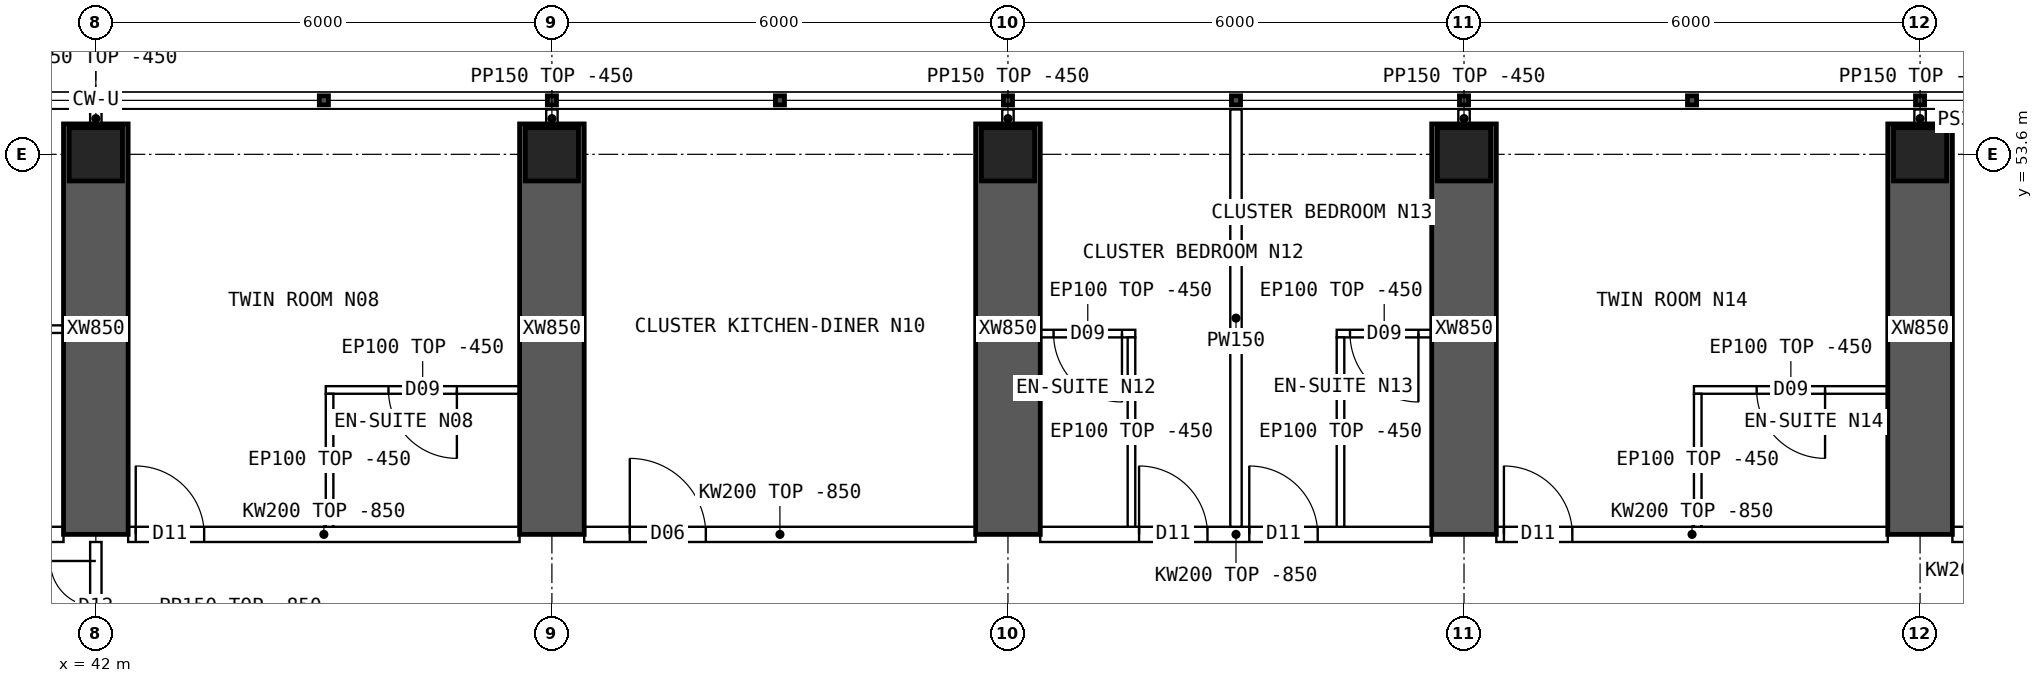
"""IFC4 building model, lengths in metres.
Left out: names, types, materials, properties, quantities, classifications, styles, units other than length and angle.
Written with IfcOpenShell. Run it as: python <this file> out.ifc"""

import sys

from ifc_helpers import new_model, si_unit, direction, frame, frame_2d, origin, origin_2d, place, context, subcontext, project, spatial, polyline, rectangle, hollow_rectangle, outline, extrude, element, fill, save


model = new_model("IFC4")
c1 = context("Model", 3, precision=1e-05, world=origin(), true_north=direction((0.0, 1.0)))
c2 = subcontext(c1, "Body", "Model", "MODEL_VIEW")
j1 = project(units=[si_unit("LENGTHUNIT", "METRE"), si_unit("PLANEANGLEUNIT", "RADIAN")], contexts=[c1])
p1 = place(None, origin())
s1 = spatial("IfcSite", under=j1, at=p1, CompositionType="ELEMENT")
p2 = place(p1, origin())
s2 = spatial("IfcBuilding", under=s1, at=p2, CompositionType="ELEMENT")
p3 = place(p2, frame((0.0, 0.0, 189.85)))
s3 = spatial("IfcBuildingStorey", under=s2, at=p3, CompositionType="ELEMENT", Elevation=189.85)
for number, where, z_axis, x_axis in (
    (1, (42.0, 53.6, 0.0), (0.0, 0.0, 1.0), (1.0, 0.0, 0.0)),
    (2, (48.0, 53.6, 0.0), (0.0, 0.0, 1.0), (1.0, 0.0, 0.0)),
    (3, (54.0, 53.6, 0.0), (0.0, 0.0, 1.0), (1.0, 0.0, 0.0)),
    (4, (60.0, 53.6, 0.0), (0.0, 0.0, 1.0), (1.0, 0.0, 0.0)),
    (5, (66.0, 53.6, 0.0), (0.0, 0.0, 1.0), (1.0, 0.0, 0.0)),
):
    element("IfcColumn", number, at=place(p3, frame(where, z_axis=z_axis, x_axis=x_axis)), inside=s3, PredefinedType="COLUMN", context=c2, shape_type="SweptSolid", body=[
        extrude(hollow_rectangle(XDim=0.7, YDim=0.7, WallThickness=0.07, at=origin_2d()), origin(), (0.0, 0.0, 1.0), 3.75),
    ])
for number, where, z_axis, x_axis in (
    (6, (42.0, 48.6, 0.0), (0.0, 0.0, 1.0), (0.0, 1.0, 0.0)),
    (7, (48.0, 48.6, 0.0), (0.0, 0.0, 1.0), (0.0, 1.0, 0.0)),
    (8, (54.0, 48.6, 0.0), (0.0, 0.0, 1.0), (0.0, 1.0, 0.0)),
    (9, (60.0, 48.6, 0.0), (0.0, 0.0, 1.0), (0.0, 1.0, 0.0)),
    (10, (66.0, 48.6, 0.0), (0.0, 0.0, 1.0), (0.0, 1.0, 0.0)),
):
    element("IfcWall", number, at=place(p3, frame(where, z_axis=z_axis, x_axis=x_axis)), inside=s3, PredefinedType="SHEAR", context=c2, shape_type="SweptSolid", body=[
        extrude(rectangle(XDim=5.4, YDim=0.85, at=frame_2d((2.7, 0.0))), origin(), (0.0, 0.0, 1.0), 3.75),
    ])
p4 = place(p3, frame((66.8, 54.05, 0.0), z_axis=(0.0, 0.0, 1.0), x_axis=(-1.0, 0.0, 0.0)))
e11 = element("IfcWall", 11, at=p4, inside=s3, PredefinedType="SOLIDWALL", context=c2, shape_type="SweptSolid", body=[
    extrude(rectangle(XDim=0.375, YDim=0.3, at=frame_2d((0.188, 0.0))), origin(), (0.0, 0.0, 1.0), 3.3),
])
p5 = place(p3, frame((36.425, 48.6, 0.0), z_axis=(0.0, 0.0, 1.0), x_axis=(1.0, 0.0, 0.0)))
e12 = element("IfcWall", 12, at=p5, inside=s3, PredefinedType="SOLIDWALL", context=c2, shape_type="SweptSolid", body=[
    extrude(outline(polyline([(0.0, 0.0), (5.15, 0.0), (5.15, 2.9), (0.0, 2.9), (0.0, 0.0)])), frame((0.0, 0.1, 0.0), z_axis=(0.0, -1.0, 0.0), x_axis=(1.0, 0.0, 0.0)), (0.0, 0.0, 1.0), 0.2),
])
p6 = place(p5, frame((0.3, 0.0, 0.0)))
e13 = element("IfcOpeningElement", 13, at=p6, cuts=e12, PredefinedType="OPENING", context=c2, shape_type="SweptSolid", body=[
    extrude(rectangle(XDim=1.0, YDim=2.1, at=frame_2d((0.5, 1.05))), frame((0.0, 0.11, 0.0), z_axis=(0.0, -1.0, 0.0), x_axis=(1.0, 0.0, 0.0)), (0.0, 0.0, 1.0), 0.22),
])
p7 = place(p3, frame((42.425, 48.6, 0.0), z_axis=(0.0, 0.0, 1.0), x_axis=(1.0, 0.0, 0.0)))
e14 = element("IfcWall", 14, at=p7, inside=s3, PredefinedType="SOLIDWALL", context=c2, shape_type="SweptSolid", body=[
    extrude(outline(polyline([(0.0, 0.0), (5.15, 0.0), (5.15, 2.9), (0.0, 2.9), (0.0, 0.0)])), frame((0.0, 0.1, 0.0), z_axis=(0.0, -1.0, 0.0), x_axis=(1.0, 0.0, 0.0)), (0.0, 0.0, 1.0), 0.2),
])
p8 = place(p7, frame((0.1, 0.0, 0.0)))
e15 = element("IfcOpeningElement", 15, at=p8, cuts=e14, PredefinedType="OPENING", context=c2, shape_type="SweptSolid", body=[
    extrude(rectangle(XDim=0.9, YDim=2.1, at=frame_2d((0.45, 1.05))), frame((0.0, 0.11, 0.0), z_axis=(0.0, -1.0, 0.0), x_axis=(1.0, 0.0, 0.0)), (0.0, 0.0, 1.0), 0.22),
])
p9 = place(p3, frame((48.425, 48.6, 0.0), z_axis=(0.0, 0.0, 1.0), x_axis=(1.0, 0.0, 0.0)))
e16 = element("IfcWall", 16, at=p9, inside=s3, PredefinedType="SOLIDWALL", context=c2, shape_type="SweptSolid", body=[
    extrude(outline(polyline([(0.0, 0.0), (5.15, 0.0), (5.15, 2.9), (0.0, 2.9), (0.0, 0.0)])), frame((0.0, 0.1, 0.0), z_axis=(0.0, -1.0, 0.0), x_axis=(1.0, 0.0, 0.0)), (0.0, 0.0, 1.0), 0.2),
])
p10 = place(p9, frame((0.6, 0.0, 0.0)))
e17 = element("IfcOpeningElement", 17, at=p10, cuts=e16, PredefinedType="OPENING", context=c2, shape_type="SweptSolid", body=[
    extrude(rectangle(XDim=1.0, YDim=2.1, at=frame_2d((0.5, 1.05))), frame((0.0, 0.11, 0.0), z_axis=(0.0, -1.0, 0.0), x_axis=(1.0, 0.0, 0.0)), (0.0, 0.0, 1.0), 0.22),
])
p11 = place(p3, frame((54.425, 48.6, 0.0), z_axis=(0.0, 0.0, 1.0), x_axis=(1.0, 0.0, 0.0)))
e18 = element("IfcWall", 18, at=p11, inside=s3, PredefinedType="SOLIDWALL", context=c2, shape_type="SweptSolid", body=[
    extrude(outline(polyline([(0.0, 0.0), (5.15, 0.0), (5.15, 2.9), (0.0, 2.9), (0.0, 0.0)])), frame((0.0, 0.1, 0.0), z_axis=(0.0, -1.0, 0.0), x_axis=(1.0, 0.0, 0.0)), (0.0, 0.0, 1.0), 0.2),
])
p12 = place(p11, frame((1.3, 0.0, 0.0)))
e19 = element("IfcOpeningElement", 19, at=p12, cuts=e18, PredefinedType="OPENING", context=c2, shape_type="SweptSolid", body=[
    extrude(rectangle(XDim=0.9, YDim=2.1, at=frame_2d((0.45, 1.05))), frame((0.0, 0.11, 0.0), z_axis=(0.0, -1.0, 0.0), x_axis=(1.0, 0.0, 0.0)), (0.0, 0.0, 1.0), 0.22),
])
p13 = place(p11, frame((2.75, 0.0, 0.0)))
e20 = element("IfcOpeningElement", 20, at=p13, cuts=e18, PredefinedType="OPENING", context=c2, shape_type="SweptSolid", body=[
    extrude(rectangle(XDim=0.9, YDim=2.1, at=frame_2d((0.45, 1.05))), frame((0.0, 0.11, 0.0), z_axis=(0.0, -1.0, 0.0), x_axis=(1.0, 0.0, 0.0)), (0.0, 0.0, 1.0), 0.22),
])
p14 = place(p3, frame((60.425, 48.6, 0.0), z_axis=(0.0, 0.0, 1.0), x_axis=(1.0, 0.0, 0.0)))
e21 = element("IfcWall", 21, at=p14, inside=s3, PredefinedType="SOLIDWALL", context=c2, shape_type="SweptSolid", body=[
    extrude(outline(polyline([(0.0, 0.0), (5.15, 0.0), (5.15, 2.9), (0.0, 2.9), (0.0, 0.0)])), frame((0.0, 0.1, 0.0), z_axis=(0.0, -1.0, 0.0), x_axis=(1.0, 0.0, 0.0)), (0.0, 0.0, 1.0), 0.2),
])
p15 = place(p14, frame((0.1, 0.0, 0.0)))
e22 = element("IfcOpeningElement", 22, at=p15, cuts=e21, PredefinedType="OPENING", context=c2, shape_type="SweptSolid", body=[
    extrude(rectangle(XDim=0.9, YDim=2.1, at=frame_2d((0.45, 1.05))), frame((0.0, 0.11, 0.0), z_axis=(0.0, -1.0, 0.0), x_axis=(1.0, 0.0, 0.0)), (0.0, 0.0, 1.0), 0.22),
])
p16 = place(p3, frame((66.425, 48.6, 0.0), z_axis=(0.0, 0.0, 1.0), x_axis=(1.0, 0.0, 0.0)))
e23 = element("IfcWall", 23, at=p16, inside=s3, PredefinedType="SOLIDWALL", context=c2, shape_type="SweptSolid", body=[
    extrude(rectangle(XDim=1.975, YDim=0.2, at=frame_2d((0.987, 0.0))), origin(), (0.0, 0.0, 1.0), 3.3),
])
p17 = place(p16, frame((0.2, 0.0, 0.0)))
e24 = element("IfcOpeningElement", 24, at=p17, cuts=e23, PredefinedType="OPENING", context=c2, shape_type="SweptSolid", body=[
    extrude(rectangle(XDim=0.9, YDim=2.1, at=frame_2d((0.45, 1.05))), frame((0.0, 0.11, 0.0), z_axis=(0.0, -1.0, 0.0), x_axis=(1.0, 0.0, 0.0)), (0.0, 0.0, 1.0), 0.22),
])
p18 = place(p3, frame((38.925, 51.3, 0.0), z_axis=(0.0, 0.0, 1.0), x_axis=(1.0, 0.0, 0.0)))
e25 = element("IfcWall", 25, at=p18, inside=s3, PredefinedType="PARTITIONING", context=c2, shape_type="SweptSolid", body=[
    extrude(rectangle(XDim=2.65, YDim=0.1, at=frame_2d((1.325, 0.0))), origin(), (0.0, 0.0, 1.0), 3.3),
])
p19 = place(p3, frame((45.025, 50.5, 0.0), z_axis=(0.0, 0.0, 1.0), x_axis=(1.0, 0.0, 0.0)))
e26 = element("IfcWall", 26, at=p19, inside=s3, PredefinedType="PARTITIONING", context=c2, shape_type="SweptSolid", body=[
    extrude(rectangle(XDim=2.55, YDim=0.1, at=frame_2d((1.275, 0.0))), origin(), (0.0, 0.0, 1.0), 3.3),
])
p20 = place(p19, frame((0.825, 0.0, 0.0)))
e27 = element("IfcOpeningElement", 27, at=p20, cuts=e26, PredefinedType="OPENING", context=c2, shape_type="SweptSolid", body=[
    extrude(rectangle(XDim=0.9, YDim=2.1, at=frame_2d((0.45, 1.05))), frame((0.0, 0.06, 0.0), z_axis=(0.0, -1.0, 0.0), x_axis=(1.0, 0.0, 0.0)), (0.0, 0.0, 1.0), 0.12),
])
p21 = place(p3, frame((45.075, 50.45, 0.0), z_axis=(0.0, 0.0, 1.0), x_axis=(0.0, -1.0, 0.0)))
e28 = element("IfcWall", 28, at=p21, inside=s3, PredefinedType="PARTITIONING", context=c2, shape_type="SweptSolid", body=[
    extrude(outline(polyline([(0.0, 0.0), (1.75, 0.0), (1.75, 2.9), (1.702, 2.9), (1.7, 3.3), (0.0, 3.3), (0.0, 0.0)])), frame((0.0, 0.05, 0.0), z_axis=(0.0, -1.0, 0.0), x_axis=(1.0, 0.0, 0.0)), (0.0, 0.0, 1.0), 0.1),
])
p22 = place(p3, frame((57.0, 54.19, 0.0), z_axis=(0.0, 0.0, 1.0), x_axis=(0.0, -1.0, 0.0)))
e29 = element("IfcWall", 29, at=p22, inside=s3, PredefinedType="PARTITIONING", context=c2, shape_type="SweptSolid", body=[
    extrude(outline(polyline([(0.0, 0.0), (5.49, 0.0), (5.49, 2.9), (5.442, 2.9), (5.44, 3.3), (0.792, 3.3), (0.79, 2.9), (0.392, 2.9), (0.39, 3.3), (0.0, 3.3), (0.0, 0.0)])), frame((0.0, 0.075, 0.0), z_axis=(0.0, -1.0, 0.0), x_axis=(1.0, 0.0, 0.0)), (0.0, 0.0, 1.0), 0.15),
])
p23 = place(p3, frame((54.425, 51.242, 0.0), z_axis=(0.0, 0.0, 1.0), x_axis=(1.0, 0.0, 0.0)))
e30 = element("IfcWall", 30, at=p23, inside=s3, PredefinedType="PARTITIONING", context=c2, shape_type="SweptSolid", body=[
    extrude(rectangle(XDim=1.25, YDim=0.1, at=frame_2d((0.625, 0.0))), origin(), (0.0, 0.0, 1.0), 3.3),
])
p24 = place(p23, frame((0.175, 0.0, 0.0)))
e31 = element("IfcOpeningElement", 31, at=p24, cuts=e30, PredefinedType="OPENING", context=c2, shape_type="SweptSolid", body=[
    extrude(rectangle(XDim=0.9, YDim=2.1, at=frame_2d((0.45, 1.05))), frame((0.0, 0.06, 0.0), z_axis=(0.0, -1.0, 0.0), x_axis=(1.0, 0.0, 0.0)), (0.0, 0.0, 1.0), 0.12),
])
p25 = place(p3, frame((55.625, 51.192, 0.0), z_axis=(0.0, 0.0, 1.0), x_axis=(0.0, -1.0, 0.0)))
e32 = element("IfcWall", 32, at=p25, inside=s3, PredefinedType="PARTITIONING", context=c2, shape_type="SweptSolid", body=[
    extrude(outline(polyline([(0.0, 0.0), (2.492, 0.0), (2.492, 2.9), (2.444, 2.9), (2.442, 3.3), (0.0, 3.3), (0.0, 0.0)])), frame((0.0, 0.05, 0.0), z_axis=(0.0, -1.0, 0.0), x_axis=(1.0, 0.0, 0.0)), (0.0, 0.0, 1.0), 0.1),
])
p26 = place(p3, frame((58.325, 51.242, 0.0), z_axis=(0.0, 0.0, 1.0), x_axis=(1.0, 0.0, 0.0)))
e33 = element("IfcWall", 33, at=p26, inside=s3, PredefinedType="PARTITIONING", context=c2, shape_type="SweptSolid", body=[
    extrude(rectangle(XDim=1.25, YDim=0.1, at=frame_2d((0.625, 0.0))), origin(), (0.0, 0.0, 1.0), 3.3),
])
p27 = place(p26, frame((0.175, 0.0, 0.0)))
e34 = element("IfcOpeningElement", 34, at=p27, cuts=e33, PredefinedType="OPENING", context=c2, shape_type="SweptSolid", body=[
    extrude(rectangle(XDim=0.9, YDim=2.1, at=frame_2d((0.45, 1.05))), frame((0.0, 0.06, 0.0), z_axis=(0.0, -1.0, 0.0), x_axis=(1.0, 0.0, 0.0)), (0.0, 0.0, 1.0), 0.12),
])
p28 = place(p3, frame((58.375, 51.192, 0.0), z_axis=(0.0, 0.0, 1.0), x_axis=(0.0, -1.0, 0.0)))
e35 = element("IfcWall", 35, at=p28, inside=s3, PredefinedType="PARTITIONING", context=c2, shape_type="SweptSolid", body=[
    extrude(outline(polyline([(0.0, 0.0), (2.492, 0.0), (2.492, 2.9), (2.444, 2.9), (2.442, 3.3), (0.0, 3.3), (0.0, 0.0)])), frame((0.0, 0.05, 0.0), z_axis=(0.0, -1.0, 0.0), x_axis=(1.0, 0.0, 0.0)), (0.0, 0.0, 1.0), 0.1),
])
p29 = place(p3, frame((63.025, 50.5, 0.0), z_axis=(0.0, 0.0, 1.0), x_axis=(1.0, 0.0, 0.0)))
e36 = element("IfcWall", 36, at=p29, inside=s3, PredefinedType="PARTITIONING", context=c2, shape_type="SweptSolid", body=[
    extrude(rectangle(XDim=2.55, YDim=0.1, at=frame_2d((1.275, 0.0))), origin(), (0.0, 0.0, 1.0), 3.3),
])
p30 = place(p29, frame((0.825, 0.0, 0.0)))
e37 = element("IfcOpeningElement", 37, at=p30, cuts=e36, PredefinedType="OPENING", context=c2, shape_type="SweptSolid", body=[
    extrude(rectangle(XDim=0.9, YDim=2.1, at=frame_2d((0.45, 1.05))), frame((0.0, 0.06, 0.0), z_axis=(0.0, -1.0, 0.0), x_axis=(1.0, 0.0, 0.0)), (0.0, 0.0, 1.0), 0.12),
])
p31 = place(p3, frame((63.075, 50.45, 0.0), z_axis=(0.0, 0.0, 1.0), x_axis=(0.0, -1.0, 0.0)))
e38 = element("IfcWall", 38, at=p31, inside=s3, PredefinedType="PARTITIONING", context=c2, shape_type="SweptSolid", body=[
    extrude(outline(polyline([(0.0, 0.0), (1.75, 0.0), (1.75, 2.9), (1.702, 2.9), (1.7, 3.3), (0.0, 3.3), (0.0, 0.0)])), frame((0.0, 0.05, 0.0), z_axis=(0.0, -1.0, 0.0), x_axis=(1.0, 0.0, 0.0)), (0.0, 0.0, 1.0), 0.1),
])
p32 = place(p3, frame((42.0, 46.8, 0.0), z_axis=(0.0, 0.0, 1.0), x_axis=(0.0, 1.0, 0.0)))
e39 = element("IfcWall", 39, at=p32, inside=s3, PredefinedType="PARTITIONING", context=c2, shape_type="SweptSolid", body=[
    extrude(outline(polyline([(0.0, 0.0), (1.7, 0.0), (1.7, 2.9), (0.0, 2.9), (0.0, 0.0)])), frame((0.0, 0.075, 0.0), z_axis=(0.0, -1.0, 0.0), x_axis=(1.0, 0.0, 0.0)), (0.0, 0.0, 1.0), 0.15),
])
p33 = place(p32, frame((0.25, 0.0, 0.0)))
e40 = element("IfcOpeningElement", 40, at=p33, cuts=e39, PredefinedType="OPENING", context=c2, shape_type="SweptSolid", body=[
    extrude(rectangle(XDim=1.2, YDim=2.1, at=frame_2d((0.6, 1.05))), frame((0.0, 0.085, 0.0), z_axis=(0.0, -1.0, 0.0), x_axis=(1.0, 0.0, 0.0)), (0.0, 0.0, 1.0), 0.17),
])
for number, where, z_axis, x_axis in (
    (41, (42.0, 53.95, 0.0), (0.0, 0.0, 1.0), (0.0, 1.0, 0.0)),
    (42, (48.0, 53.95, 0.0), (0.0, 0.0, 1.0), (0.0, 1.0, 0.0)),
    (43, (54.0, 53.95, 0.0), (0.0, 0.0, 1.0), (0.0, 1.0, 0.0)),
    (44, (60.0, 53.95, 0.0), (0.0, 0.0, 1.0), (0.0, 1.0, 0.0)),
    (45, (66.0, 53.95, 0.0), (0.0, 0.0, 1.0), (0.0, 1.0, 0.0)),
):
    element("IfcWall", number, at=place(p3, frame(where, z_axis=z_axis, x_axis=x_axis)), inside=s3, PredefinedType="PARTITIONING", context=c2, shape_type="SweptSolid", body=[
        extrude(rectangle(XDim=0.24, YDim=0.15, at=frame_2d((0.12, 0.0))), origin(), (0.0, 0.0, 1.0), 3.3),
    ])
p34 = place(p20, origin())
e46 = element("IfcDoor", 46, at=p34, inside=s3, OperationType="SINGLE_SWING_RIGHT", PredefinedType="DOOR", context=c2, shape_type="SweptSolid", body=[
    extrude(rectangle(XDim=0.9, YDim=2.1, at=frame_2d((0.45, 1.05))), frame((0.0, 0.025, 0.0), z_axis=(0.0, -1.0, 0.0), x_axis=(1.0, 0.0, 0.0)), (0.0, 0.0, 1.0), 0.05),
])
fill(e27, e46)
p35 = place(p8, origin())
e47 = element("IfcDoor", 47, at=p35, inside=s3, OperationType="SINGLE_SWING_LEFT", PredefinedType="DOOR", context=c2, shape_type="SweptSolid", body=[
    extrude(rectangle(XDim=0.9, YDim=2.1, at=frame_2d((0.45, 1.05))), frame((0.0, 0.025, 0.0), z_axis=(0.0, -1.0, 0.0), x_axis=(1.0, 0.0, 0.0)), (0.0, 0.0, 1.0), 0.05),
])
fill(e15, e47)
p36 = place(p10, origin())
e48 = element("IfcDoor", 48, at=p36, inside=s3, OperationType="SINGLE_SWING_LEFT", PredefinedType="DOOR", context=c2, shape_type="SweptSolid", body=[
    extrude(rectangle(XDim=1.0, YDim=2.1, at=frame_2d((0.5, 1.05))), frame((0.0, 0.025, 0.0), z_axis=(0.0, -1.0, 0.0), x_axis=(1.0, 0.0, 0.0)), (0.0, 0.0, 1.0), 0.05),
])
fill(e17, e48)
p37 = place(p24, origin())
e49 = element("IfcDoor", 49, at=p37, inside=s3, OperationType="SINGLE_SWING_RIGHT", PredefinedType="DOOR", context=c2, shape_type="SweptSolid", body=[
    extrude(rectangle(XDim=0.9, YDim=2.1, at=frame_2d((0.45, 1.05))), frame((0.0, 0.025, 0.0), z_axis=(0.0, -1.0, 0.0), x_axis=(1.0, 0.0, 0.0)), (0.0, 0.0, 1.0), 0.05),
])
fill(e31, e49)
p38 = place(p12, origin())
e50 = element("IfcDoor", 50, at=p38, inside=s3, OperationType="SINGLE_SWING_LEFT", PredefinedType="DOOR", context=c2, shape_type="SweptSolid", body=[
    extrude(rectangle(XDim=0.9, YDim=2.1, at=frame_2d((0.45, 1.05))), frame((0.0, 0.025, 0.0), z_axis=(0.0, -1.0, 0.0), x_axis=(1.0, 0.0, 0.0)), (0.0, 0.0, 1.0), 0.05),
])
fill(e19, e50)
p39 = place(p27, origin())
e51 = element("IfcDoor", 51, at=p39, inside=s3, OperationType="SINGLE_SWING_RIGHT", PredefinedType="DOOR", context=c2, shape_type="SweptSolid", body=[
    extrude(rectangle(XDim=0.9, YDim=2.1, at=frame_2d((0.45, 1.05))), frame((0.0, 0.025, 0.0), z_axis=(0.0, -1.0, 0.0), x_axis=(1.0, 0.0, 0.0)), (0.0, 0.0, 1.0), 0.05),
])
fill(e34, e51)
p40 = place(p13, origin())
e52 = element("IfcDoor", 52, at=p40, inside=s3, OperationType="SINGLE_SWING_LEFT", PredefinedType="DOOR", context=c2, shape_type="SweptSolid", body=[
    extrude(rectangle(XDim=0.9, YDim=2.1, at=frame_2d((0.45, 1.05))), frame((0.0, 0.025, 0.0), z_axis=(0.0, -1.0, 0.0), x_axis=(1.0, 0.0, 0.0)), (0.0, 0.0, 1.0), 0.05),
])
fill(e20, e52)
p41 = place(p30, origin())
e53 = element("IfcDoor", 53, at=p41, inside=s3, OperationType="SINGLE_SWING_RIGHT", PredefinedType="DOOR", context=c2, shape_type="SweptSolid", body=[
    extrude(rectangle(XDim=0.9, YDim=2.1, at=frame_2d((0.45, 1.05))), frame((0.0, 0.025, 0.0), z_axis=(0.0, -1.0, 0.0), x_axis=(1.0, 0.0, 0.0)), (0.0, 0.0, 1.0), 0.05),
])
fill(e37, e53)
p42 = place(p15, origin())
e54 = element("IfcDoor", 54, at=p42, inside=s3, OperationType="SINGLE_SWING_LEFT", PredefinedType="DOOR", context=c2, shape_type="SweptSolid", body=[
    extrude(rectangle(XDim=0.9, YDim=2.1, at=frame_2d((0.45, 1.05))), frame((0.0, 0.025, 0.0), z_axis=(0.0, -1.0, 0.0), x_axis=(1.0, 0.0, 0.0)), (0.0, 0.0, 1.0), 0.05),
])
fill(e22, e54)
p43 = place(p33, origin())
e55 = element("IfcDoor", 55, at=p43, inside=s3, OperationType="DOUBLE_DOOR_SINGLE_SWING", PredefinedType="DOOR", context=c2, shape_type="SweptSolid", body=[
    extrude(rectangle(XDim=1.2, YDim=2.1, at=frame_2d((0.6, 1.05))), frame((0.0, 0.025, 0.0), z_axis=(0.0, -1.0, 0.0), x_axis=(1.0, 0.0, 0.0)), (0.0, 0.0, 1.0), 0.05),
])
fill(e40, e55)
save(model, sys.argv[1])
